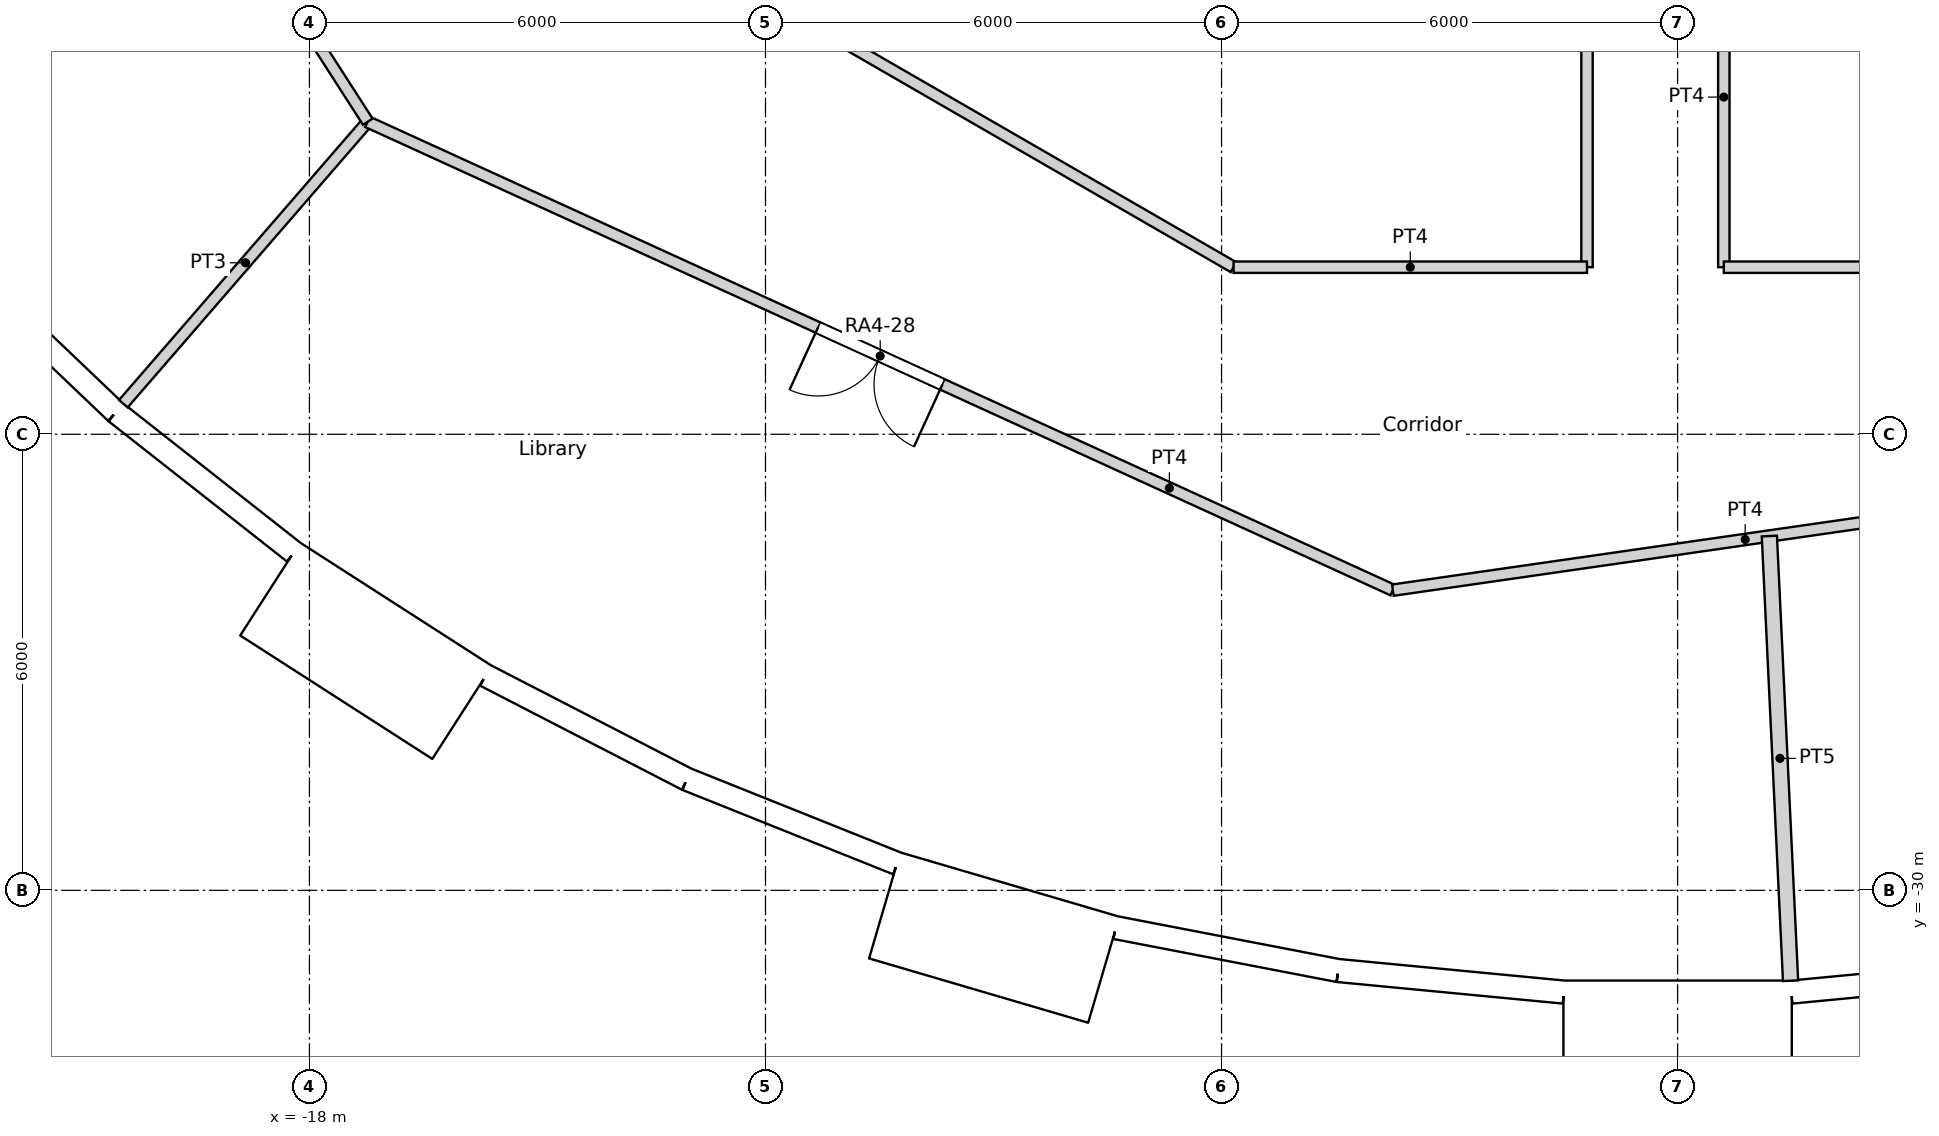
"""IFC4 building model, lengths in metres.
Left out: names, types, materials, properties, quantities, classifications, styles, units other than length and angle.
Written with IfcOpenShell. Run it as: python <this file> out.ifc"""

import sys

from ifc_helpers import new_model, si_unit, direction, frame, frame_2d, origin, origin_2d, place, context, subcontext, project, spatial, rectangle, circle, extrude, element, fill, save


model = new_model("IFC4")
c1 = context("Model", 3, precision=1e-05, world=origin(), true_north=direction((0.0, 1.0)))
c2 = subcontext(c1, "Body", "Model", "MODEL_VIEW")
j1 = project(units=[si_unit("LENGTHUNIT", "METRE"), si_unit("PLANEANGLEUNIT", "RADIAN")], contexts=[c1])
p1 = place(None, origin())
s1 = spatial("IfcSite", under=j1, at=p1, CompositionType="ELEMENT")
p2 = place(p1, origin())
s2 = spatial("IfcBuilding", under=s1, at=p2, CompositionType="ELEMENT")
p3 = place(p2, frame((0.0, 0.0, 60.6)))
s3 = spatial("IfcBuildingStorey", under=s2, at=p3, CompositionType="ELEMENT", Elevation=60.6)
for number, where, z_axis, x_axis in (
    (1, (-19.826, -22.88, 0.0), (0.0, 0.0, 1.0), (1.0, 0.0, 0.0)),
    (2, (-15.137, -26.219, 0.0), (0.0, 0.0, 1.0), (1.0, 0.0, 0.0)),
    (3, (-9.902, -28.61, 0.0), (0.0, 0.0, 1.0), (1.0, 0.0, 0.0)),
    (4, (-4.309, -29.966, 0.0), (0.0, 0.0, 1.0), (1.0, 0.0, 0.0)),
    (5, (1.44, -30.24, 0.0), (0.0, 0.0, 1.0), (1.0, 0.0, 0.0)),
):
    element("IfcColumn", number, at=place(p3, frame(where, z_axis=z_axis, x_axis=x_axis)), inside=s3, PredefinedType="COLUMN", context=c2, shape_type="SweptSolid", body=[
        extrude(circle(Radius=0.7, at=origin_2d()), origin(), (0.0, 0.0, 1.0), 3.6),
    ])
for number, where, z_axis, x_axis in (
    (6, (-12.274, -21.259, 0.0), (0.0, 0.0, 1.0), (1.0, 0.0, 0.0)),
    (7, (-7.04, -23.516, 0.0), (0.0, 0.0, 1.0), (1.0, 0.0, 0.0)),
    (8, (-1.427, -24.506, 0.0), (0.0, 0.0, 1.0), (1.0, 0.0, 0.0)),
):
    element("IfcColumn", number, at=place(p3, frame(where, z_axis=z_axis, x_axis=x_axis)), inside=s3, PredefinedType="COLUMN", context=c2, shape_type="SweptSolid", body=[
        extrude(circle(Radius=0.75, at=origin_2d()), origin(), (0.0, 0.0, 1.0), 3.6),
    ])
for number, where, z_axis, x_axis in (
    (9, (-4.188, -18.35, 0.0), (0.0, 0.0, 1.0), (1.0, 0.0, 0.0)),
    (10, (1.406, -18.77, 0.0), (0.0, 0.0, 1.0), (1.0, 0.0, 0.0)),
):
    element("IfcColumn", number, at=place(p3, frame(where, z_axis=z_axis, x_axis=x_axis)), inside=s3, PredefinedType="COLUMN", context=c2, shape_type="SweptSolid", body=[
        extrude(circle(Radius=0.8, at=origin_2d()), origin(), (0.0, 0.0, 1.0), 3.6),
    ])
p4 = place(p3, frame((-22.702, -21.655, 0.0), z_axis=(0.0, 0.0, 1.0), x_axis=(0.723744206617, -0.690068346896, 0.0)))
e11 = element("IfcWall", 11, at=p4, inside=s3, PredefinedType="SOLIDWALL", context=c2, shape_type="SweptSolid", body=[
    extrude(rectangle(XDim=2.98, YDim=0.3, at=frame_2d((1.49, 0.0))), origin(), (0.0, 0.0, 1.0), 2.65),
])
p5 = place(p4, frame((1.49, 0.0, 1.55)))
e12 = element("IfcOpeningElement", 12, at=p5, cuts=e11, PredefinedType="OPENING", context=c2, shape_type="SweptSolid", body=[
    extrude(circle(Radius=0.9, at=origin_2d()), frame((0.0, 0.16, 0.0), z_axis=(0.0, -1.0, 0.0), x_axis=(1.0, 0.0, 0.0)), (0.0, 0.0, 1.0), 0.32),
])
p6 = place(p3, frame((-20.546, -23.711, 0.0), z_axis=(0.0, 0.0, 1.0), x_axis=(0.786045331304, -0.618168858108, 0.0)))
e13 = element("IfcWall", 13, at=p6, inside=s3, PredefinedType="SOLIDWALL", context=c2, shape_type="SweptSolid", body=[
    extrude(rectangle(XDim=2.98, YDim=0.3, at=frame_2d((1.49, 0.0))), origin(), (0.0, 0.0, 1.0), 3.15),
])
p7 = place(p6, frame((1.49, 0.0, 1.55)))
e14 = element("IfcOpeningElement", 14, at=p7, cuts=e13, PredefinedType="OPENING", context=c2, shape_type="SweptSolid", body=[
    extrude(circle(Radius=0.9, at=origin_2d()), frame((0.0, 0.16, 0.0), z_axis=(0.0, -1.0, 0.0), x_axis=(1.0, 0.0, 0.0)), (0.0, 0.0, 1.0), 0.32),
])
p8 = place(p3, frame((-18.516, -26.037, -0.45), z_axis=(0.0, 0.0, 1.0), x_axis=(0.841223422347, -0.540687667415, 0.0)))
e15 = element("IfcWall", 15, at=p8, inside=s3, PredefinedType="ELEMENTEDWALL", context=c2, shape_type="SweptSolid", body=[
    extrude(rectangle(XDim=3.0, YDim=1.45, at=frame_2d((1.5, 0.0))), origin(), (0.0, 0.0, 1.0), 3.6),
])
p9 = place(p8, frame((1.5, 0.0, 2.0)))
e16 = element("IfcOpeningElement", 16, at=p9, cuts=e15, PredefinedType="OPENING", context=c2, shape_type="SweptSolid", body=[
    extrude(circle(Radius=0.9, at=origin_2d()), frame((0.0, 0.735, 0.0), z_axis=(0.0, -1.0, 0.0), x_axis=(1.0, 0.0, 0.0)), (0.0, 0.0, 1.0), 1.47),
])
p10 = place(p3, frame((-15.682, -27.174, 0.0), z_axis=(0.0, 0.0, 1.0), x_axis=(0.888819853856, -0.458256770153, 0.0)))
e17 = element("IfcWall", 17, at=p10, inside=s3, PredefinedType="SOLIDWALL", context=c2, shape_type="SweptSolid", body=[
    extrude(rectangle(XDim=2.98, YDim=0.3, at=frame_2d((1.49, 0.0))), origin(), (0.0, 0.0, 1.0), 2.65),
])
p11 = place(p10, frame((1.49, 0.0, 1.55)))
e18 = element("IfcOpeningElement", 18, at=p11, cuts=e17, PredefinedType="OPENING", context=c2, shape_type="SweptSolid", body=[
    extrude(circle(Radius=0.9, at=origin_2d()), frame((0.0, 0.16, 0.0), z_axis=(0.0, -1.0, 0.0), x_axis=(1.0, 0.0, 0.0)), (0.0, 0.0, 1.0), 0.32),
])
p12 = place(p3, frame((-13.033, -28.539, 0.0), z_axis=(0.0, 0.0, 1.0), x_axis=(0.928403213937, -0.371574316054, 0.0)))
e19 = element("IfcWall", 19, at=p12, inside=s3, PredefinedType="SOLIDWALL", context=c2, shape_type="SweptSolid", body=[
    extrude(rectangle(XDim=2.98, YDim=0.3, at=frame_2d((1.49, 0.0))), origin(), (0.0, 0.0, 1.0), 3.15),
])
p13 = place(p12, frame((1.49, 0.0, 1.55)))
e20 = element("IfcOpeningElement", 20, at=p13, cuts=e19, PredefinedType="OPENING", context=c2, shape_type="SweptSolid", body=[
    extrude(circle(Radius=0.9, at=origin_2d()), frame((0.0, 0.16, 0.0), z_axis=(0.0, -1.0, 0.0), x_axis=(1.0, 0.0, 0.0)), (0.0, 0.0, 1.0), 0.32),
])
p14 = place(p3, frame((-10.43, -30.198, -0.45), z_axis=(0.0, 0.0, 1.0), x_axis=(0.959489813418, -0.281743319258, 0.0)))
e21 = element("IfcWall", 21, at=p14, inside=s3, PredefinedType="ELEMENTEDWALL", context=c2, shape_type="SweptSolid", body=[
    extrude(rectangle(XDim=3.0, YDim=1.45, at=frame_2d((1.5, 0.0))), origin(), (0.0, 0.0, 1.0), 3.6),
])
p15 = place(p14, frame((1.5, 0.0, 2.0)))
e22 = element("IfcOpeningElement", 22, at=p15, cuts=e21, PredefinedType="OPENING", context=c2, shape_type="SweptSolid", body=[
    extrude(circle(Radius=0.9, at=origin_2d()), frame((0.0, 0.735, 0.0), z_axis=(0.0, -1.0, 0.0), x_axis=(1.0, 0.0, 0.0)), (0.0, 0.0, 1.0), 1.47),
])
p16 = place(p3, frame((-7.391, -30.491, 0.0), z_axis=(0.0, 0.0, 1.0), x_axis=(0.981924535406, -0.189272836848, 0.0)))
e23 = element("IfcWall", 23, at=p16, inside=s3, PredefinedType="SOLIDWALL", context=c2, shape_type="SweptSolid", body=[
    extrude(rectangle(XDim=2.98, YDim=0.3, at=frame_2d((1.49, 0.0))), origin(), (0.0, 0.0, 1.0), 2.65),
])
p17 = place(p16, frame((1.49, 0.0, 1.55)))
e24 = element("IfcOpeningElement", 24, at=p17, cuts=e23, PredefinedType="OPENING", context=c2, shape_type="SweptSolid", body=[
    extrude(circle(Radius=0.9, at=origin_2d()), frame((0.0, 0.16, 0.0), z_axis=(0.0, -1.0, 0.0), x_axis=(1.0, 0.0, 0.0)), (0.0, 0.0, 1.0), 0.32),
])
p18 = place(p3, frame((-4.465, -31.055, 0.0), z_axis=(0.0, 0.0, 1.0), x_axis=(0.995473351551, -0.095041077185, 0.0)))
e25 = element("IfcWall", 25, at=p18, inside=s3, PredefinedType="SOLIDWALL", context=c2, shape_type="SweptSolid", body=[
    extrude(rectangle(XDim=2.98, YDim=0.3, at=frame_2d((1.49, 0.0))), origin(), (0.0, 0.0, 1.0), 3.15),
])
p19 = place(p18, frame((1.49, 0.0, 1.55)))
e26 = element("IfcOpeningElement", 26, at=p19, cuts=e25, PredefinedType="OPENING", context=c2, shape_type="SweptSolid", body=[
    extrude(circle(Radius=0.9, at=origin_2d()), frame((0.0, 0.16, 0.0), z_axis=(0.0, -1.0, 0.0), x_axis=(1.0, 0.0, 0.0)), (0.0, 0.0, 1.0), 0.32),
])
p20 = place(p3, frame((-1.5, -31.914, -0.45), z_axis=(0.0, 0.0, 1.0), x_axis=(1.0, 0.0, 0.0)))
e27 = element("IfcWall", 27, at=p20, inside=s3, PredefinedType="ELEMENTEDWALL", context=c2, shape_type="SweptSolid", body=[
    extrude(rectangle(XDim=3.0, YDim=1.45, at=frame_2d((1.5, 0.0))), origin(), (0.0, 0.0, 1.0), 3.6),
])
p21 = place(p20, frame((1.5, 0.0, 2.0)))
e28 = element("IfcOpeningElement", 28, at=p21, cuts=e27, PredefinedType="OPENING", context=c2, shape_type="SweptSolid", body=[
    extrude(circle(Radius=0.9, at=origin_2d()), frame((0.0, 0.735, 0.0), z_axis=(0.0, -1.0, 0.0), x_axis=(1.0, 0.0, 0.0)), (0.0, 0.0, 1.0), 1.47),
])
p22 = place(p3, frame((1.499, -31.338, 0.0), z_axis=(0.0, 0.0, 1.0), x_axis=(0.995473351551, 0.095041077185, 0.0)))
e29 = element("IfcWall", 29, at=p22, inside=s3, PredefinedType="SOLIDWALL", context=c2, shape_type="SweptSolid", body=[
    extrude(rectangle(XDim=2.98, YDim=0.3, at=frame_2d((1.49, 0.0))), origin(), (0.0, 0.0, 1.0), 2.65),
])
p23 = place(p22, frame((1.49, 0.0, 1.55)))
e30 = element("IfcOpeningElement", 30, at=p23, cuts=e29, PredefinedType="OPENING", context=c2, shape_type="SweptSolid", body=[
    extrude(circle(Radius=0.9, at=origin_2d()), frame((0.0, 0.16, 0.0), z_axis=(0.0, -1.0, 0.0), x_axis=(1.0, 0.0, 0.0)), (0.0, 0.0, 1.0), 0.32),
])
p24 = place(p3, frame((-25.253, -7.415, 0.0), z_axis=(0.0, 0.0, 1.0), x_axis=(0.540867421004, -0.841107860442, 0.0)))
e31 = element("IfcWall", 31, at=p24, inside=s3, PredefinedType="PARTITIONING", context=c2, shape_type="SweptSolid", body=[
    extrude(rectangle(XDim=14.829, YDim=0.15, at=frame_2d((7.415, 0.0))), origin(), (0.0, 0.0, 1.0), 3.15),
])
p25 = place(p24, frame((8.926, 0.0, 0.0)))
e32 = element("IfcOpeningElement", 32, at=p25, cuts=e31, PredefinedType="OPENING", context=c2, shape_type="SweptSolid", body=[
    extrude(rectangle(XDim=1.8, YDim=2.1, at=frame_2d((0.9, 1.05))), frame((0.0, 0.075, 0.0), z_axis=(0.0, -1.0, 0.0), x_axis=(1.0, 0.0, 0.0)), (0.0, 0.0, 1.0), 0.15),
])
p26 = place(p3, frame((-15.96, -15.96, 0.0), z_axis=(0.0, 0.0, 1.0), x_axis=(0.866022730501, -0.500004630234, 0.0)))
e33 = element("IfcWall", 33, at=p26, inside=s3, PredefinedType="PARTITIONING", context=c2, shape_type="SweptSolid", body=[
    extrude(rectangle(XDim=11.684, YDim=0.15, at=frame_2d((5.842, 0.0))), origin(), (0.0, 0.0, 1.0), 3.15),
])
p27 = place(p3, frame((-5.842, -21.802, 0.0), z_axis=(0.0, 0.0, 1.0), x_axis=(1.0, 0.0, 0.0)))
e34 = element("IfcWall", 34, at=p27, inside=s3, PredefinedType="PARTITIONING", context=c2, shape_type="SweptSolid", body=[
    extrude(rectangle(XDim=4.65, YDim=0.15, at=frame_2d((2.325, 0.0))), origin(), (0.0, 0.0, 1.0), 3.15),
])
p28 = place(p3, frame((-1.192, -21.802, 0.0), z_axis=(0.0, 0.0, 1.0), x_axis=(0.0, 1.0, 0.0)))
e35 = element("IfcWall", 35, at=p28, inside=s3, PredefinedType="PARTITIONING", context=c2, shape_type="SweptSolid", body=[
    extrude(rectangle(XDim=10.002, YDim=0.15, at=frame_2d((5.001, 0.0))), origin(), (0.0, 0.0, 1.0), 3.15),
])
p29 = place(p3, frame((0.608, -21.802, 0.0), z_axis=(0.0, 0.0, 1.0), x_axis=(0.0, 1.0, 0.0)))
e36 = element("IfcWall", 36, at=p29, inside=s3, PredefinedType="PARTITIONING", context=c2, shape_type="SweptSolid", body=[
    extrude(rectangle(XDim=10.002, YDim=0.15, at=frame_2d((5.001, 0.0))), origin(), (0.0, 0.0, 1.0), 3.15),
])
p30 = place(p29, frame((4.526, 0.0, 0.0)))
e37 = element("IfcOpeningElement", 37, at=p30, cuts=e36, PredefinedType="OPENING", context=c2, shape_type="SweptSolid", body=[
    extrude(rectangle(XDim=0.95, YDim=2.1, at=frame_2d((0.475, 1.05))), frame((0.0, 0.075, 0.0), z_axis=(0.0, -1.0, 0.0), x_axis=(1.0, 0.0, 0.0)), (0.0, 0.0, 1.0), 0.15),
])
p31 = place(p3, frame((0.608, -21.802, 0.0), z_axis=(0.0, 0.0, 1.0), x_axis=(1.0, 0.0, 0.0)))
e38 = element("IfcWall", 38, at=p31, inside=s3, PredefinedType="PARTITIONING", context=c2, shape_type="SweptSolid", body=[
    extrude(rectangle(XDim=5.234, YDim=0.15, at=frame_2d((2.617, 0.0))), origin(), (0.0, 0.0, 1.0), 3.15),
])
p32 = place(p3, frame((-3.746, -26.051, 0.0), z_axis=(0.0, 0.0, 1.0), x_axis=(0.9898137179, 0.142368549395, 0.0)))
e39 = element("IfcWall", 39, at=p32, inside=s3, PredefinedType="PARTITIONING", context=c2, shape_type="SweptSolid", body=[
    extrude(rectangle(XDim=14.83, YDim=0.15, at=frame_2d((7.415, 0.0))), origin(), (0.0, 0.0, 1.0), 3.15),
])
p33 = place(p32, frame((9.415, 0.0, 0.0)))
e40 = element("IfcOpeningElement", 40, at=p33, cuts=e39, PredefinedType="OPENING", context=c2, shape_type="SweptSolid", body=[
    extrude(rectangle(XDim=1.5, YDim=2.1, at=frame_2d((0.75, 1.05))), frame((0.0, 0.075, 0.0), z_axis=(0.0, -1.0, 0.0), x_axis=(1.0, 0.0, 0.0)), (0.0, 0.0, 1.0), 0.15),
])
p34 = place(p3, frame((-17.235, -19.89, 0.0), z_axis=(0.0, 0.0, 1.0), x_axis=(0.90960889055, -0.415465601743, 0.0)))
e41 = element("IfcWall", 41, at=p34, inside=s3, PredefinedType="PARTITIONING", context=c2, shape_type="SweptSolid", body=[
    extrude(rectangle(XDim=14.829, YDim=0.15, at=frame_2d((7.415, 0.0))), origin(), (0.0, 0.0, 1.0), 3.15),
])
p35 = place(p34, frame((6.514, 0.0, 0.0)))
e42 = element("IfcOpeningElement", 42, at=p35, cuts=e41, PredefinedType="OPENING", context=c2, shape_type="SweptSolid", body=[
    extrude(rectangle(XDim=1.8, YDim=2.1, at=frame_2d((0.9, 1.05))), frame((0.0, 0.075, 0.0), z_axis=(0.0, -1.0, 0.0), x_axis=(1.0, 0.0, 0.0)), (0.0, 0.0, 1.0), 0.15),
])
p36 = place(p3, frame((-20.448, -23.598, 0.0), z_axis=(0.0, 0.0, 1.0), x_axis=(0.654847179409, 0.755761319214, 0.0)))
e43 = element("IfcWall", 43, at=p36, inside=s3, PredefinedType="PARTITIONING", context=c2, shape_type="SweptSolid", body=[
    extrude(rectangle(XDim=4.906, YDim=0.15, at=frame_2d((2.453, 0.0))), origin(), (0.0, 0.0, 1.0), 3.15),
])
p37 = place(p3, frame((1.207, -25.339, 0.0), z_axis=(0.0, 0.0, 1.0), x_axis=(0.047648334785, -0.998864173045, 0.0)))
e44 = element("IfcWall", 44, at=p37, inside=s3, PredefinedType="PARTITIONING", context=c2, shape_type="SweptSolid", body=[
    extrude(rectangle(XDim=5.856, YDim=0.2, at=frame_2d((2.928, 0.0))), origin(), (0.0, 0.0, 1.0), 3.15),
])
p38 = place(p5, origin())
e45 = element("IfcWindow", 45, at=p38, inside=s3, PartitioningType="SINGLE_PANEL", PredefinedType="WINDOW", context=c2, shape_type="SweptSolid", body=[
    extrude(circle(Radius=0.9, at=origin_2d()), frame((0.0, 0.12, 0.0), z_axis=(0.0, -1.0, 0.0), x_axis=(1.0, 0.0, 0.0)), (0.0, 0.0, 1.0), 0.1),
])
fill(e12, e45)
p39 = place(p7, origin())
e46 = element("IfcWindow", 46, at=p39, inside=s3, PartitioningType="SINGLE_PANEL", PredefinedType="WINDOW", context=c2, shape_type="SweptSolid", body=[
    extrude(circle(Radius=0.9, at=origin_2d()), frame((0.0, 0.12, 0.0), z_axis=(0.0, -1.0, 0.0), x_axis=(1.0, 0.0, 0.0)), (0.0, 0.0, 1.0), 0.1),
])
fill(e14, e46)
p40 = place(p9, origin())
e47 = element("IfcWindow", 47, at=p40, inside=s3, PartitioningType="SINGLE_PANEL", PredefinedType="WINDOW", context=c2, shape_type="SweptSolid", body=[
    extrude(circle(Radius=0.9, at=origin_2d()), frame((0.0, 0.695, 0.0), z_axis=(0.0, -1.0, 0.0), x_axis=(1.0, 0.0, 0.0)), (0.0, 0.0, 1.0), 0.1),
])
fill(e16, e47)
p41 = place(p11, origin())
e48 = element("IfcWindow", 48, at=p41, inside=s3, PartitioningType="SINGLE_PANEL", PredefinedType="WINDOW", context=c2, shape_type="SweptSolid", body=[
    extrude(circle(Radius=0.9, at=origin_2d()), frame((0.0, 0.12, 0.0), z_axis=(0.0, -1.0, 0.0), x_axis=(1.0, 0.0, 0.0)), (0.0, 0.0, 1.0), 0.1),
])
fill(e18, e48)
p42 = place(p13, origin())
e49 = element("IfcWindow", 49, at=p42, inside=s3, PartitioningType="SINGLE_PANEL", PredefinedType="WINDOW", context=c2, shape_type="SweptSolid", body=[
    extrude(circle(Radius=0.9, at=origin_2d()), frame((0.0, 0.12, 0.0), z_axis=(0.0, -1.0, 0.0), x_axis=(1.0, 0.0, 0.0)), (0.0, 0.0, 1.0), 0.1),
])
fill(e20, e49)
p43 = place(p15, origin())
e50 = element("IfcWindow", 50, at=p43, inside=s3, PartitioningType="SINGLE_PANEL", PredefinedType="WINDOW", context=c2, shape_type="SweptSolid", body=[
    extrude(circle(Radius=0.9, at=origin_2d()), frame((0.0, 0.695, 0.0), z_axis=(0.0, -1.0, 0.0), x_axis=(1.0, 0.0, 0.0)), (0.0, 0.0, 1.0), 0.1),
])
fill(e22, e50)
p44 = place(p17, origin())
e51 = element("IfcWindow", 51, at=p44, inside=s3, PartitioningType="SINGLE_PANEL", PredefinedType="WINDOW", context=c2, shape_type="SweptSolid", body=[
    extrude(circle(Radius=0.9, at=origin_2d()), frame((0.0, 0.12, 0.0), z_axis=(0.0, -1.0, 0.0), x_axis=(1.0, 0.0, 0.0)), (0.0, 0.0, 1.0), 0.1),
])
fill(e24, e51)
p45 = place(p19, origin())
e52 = element("IfcWindow", 52, at=p45, inside=s3, PartitioningType="SINGLE_PANEL", PredefinedType="WINDOW", context=c2, shape_type="SweptSolid", body=[
    extrude(circle(Radius=0.9, at=origin_2d()), frame((0.0, 0.12, 0.0), z_axis=(0.0, -1.0, 0.0), x_axis=(1.0, 0.0, 0.0)), (0.0, 0.0, 1.0), 0.1),
])
fill(e26, e52)
p46 = place(p21, origin())
e53 = element("IfcWindow", 53, at=p46, inside=s3, PartitioningType="SINGLE_PANEL", PredefinedType="WINDOW", context=c2, shape_type="SweptSolid", body=[
    extrude(circle(Radius=0.9, at=origin_2d()), frame((0.0, 0.695, 0.0), z_axis=(0.0, -1.0, 0.0), x_axis=(1.0, 0.0, 0.0)), (0.0, 0.0, 1.0), 0.1),
])
fill(e28, e53)
p47 = place(p23, origin())
e54 = element("IfcWindow", 54, at=p47, inside=s3, PartitioningType="SINGLE_PANEL", PredefinedType="WINDOW", context=c2, shape_type="SweptSolid", body=[
    extrude(circle(Radius=0.9, at=origin_2d()), frame((0.0, 0.12, 0.0), z_axis=(0.0, -1.0, 0.0), x_axis=(1.0, 0.0, 0.0)), (0.0, 0.0, 1.0), 0.1),
])
fill(e30, e54)
p48 = place(p35, origin())
e55 = element("IfcDoor", 55, at=p48, inside=s3, OperationType="DOUBLE_DOOR_SINGLE_SWING", PredefinedType="DOOR", context=c2, shape_type="SweptSolid", body=[
    extrude(rectangle(XDim=1.8, YDim=2.1, at=frame_2d((0.9, 1.05))), frame((0.0, 0.025, 0.0), z_axis=(0.0, -1.0, 0.0), x_axis=(1.0, 0.0, 0.0)), (0.0, 0.0, 1.0), 0.05),
])
fill(e42, e55)
save(model, sys.argv[1])
